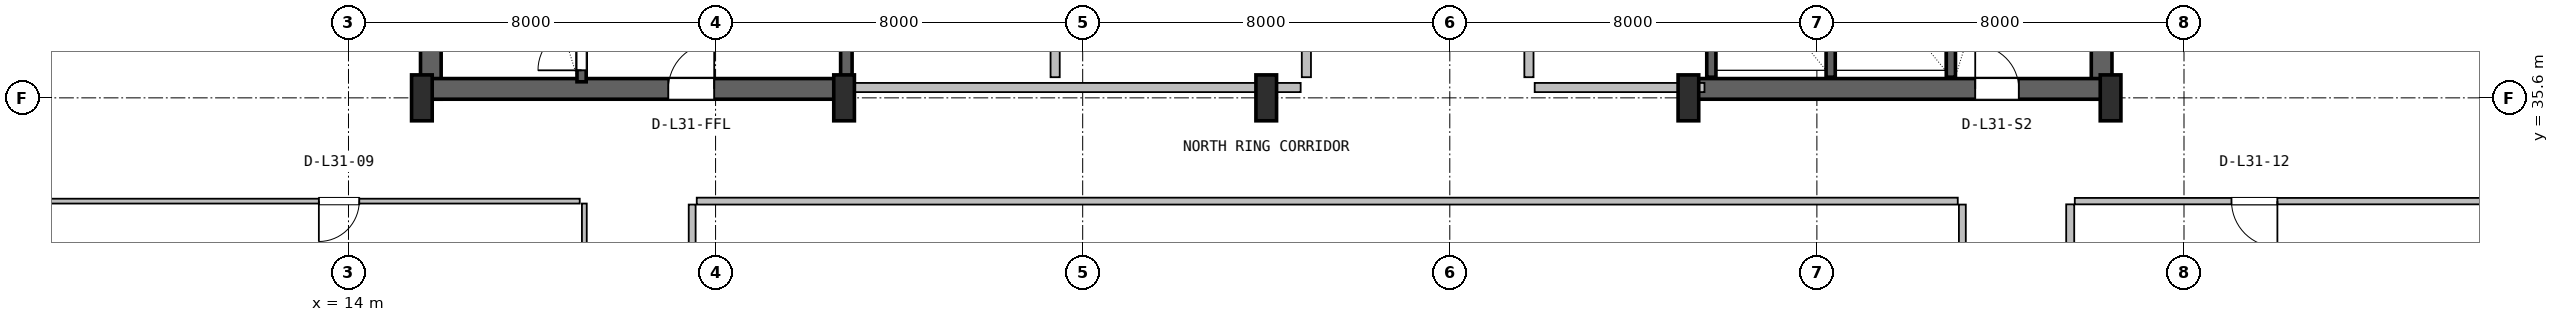
"""IFC4 building model, lengths in metres.
Left out: names, types, materials, properties, quantities, classifications, styles, units other than length and angle.
Written with IfcOpenShell. Run it as: python <this file> out.ifc"""

import sys

from ifc_helpers import new_model, si_unit, direction, frame, frame_2d, origin, origin_2d, place, context, subcontext, project, spatial, rectangle, i_section, extrude, source, transform, mapped, element, fill, save


model = new_model("IFC4")
c1 = context("Model", 3, precision=1e-05, world=origin(), true_north=direction((0.0, 1.0)))
c2 = subcontext(c1, "Body", "Model", "MODEL_VIEW")
j1 = project(units=[si_unit("LENGTHUNIT", "METRE"), si_unit("PLANEANGLEUNIT", "RADIAN")], contexts=[c1])
p1 = place(None, origin())
s1 = spatial("IfcSite", under=j1, at=p1, CompositionType="ELEMENT")
p2 = place(p1, origin())
s2 = spatial("IfcBuilding", under=s1, at=p2, CompositionType="ELEMENT")
p3 = place(p2, frame((0.0, 0.0, 129.6)))
s3 = spatial("IfcBuildingStorey", under=s2, at=p3, CompositionType="ELEMENT", Elevation=129.6)
for number, where, z_axis, x_axis in (
    (1, (15.795, 35.57, 0.0), (0.0, 0.0, 1.0), (0.0, 1.0, 0.0)),
    (2, (52.205, 35.57, 0.0), (0.0, 0.0, 1.0), (0.0, 1.0, 0.0)),
):
    element("IfcWall", number, at=place(p3, frame(where, z_axis=z_axis, x_axis=x_axis)), inside=s3, PredefinedType="SHEAR", context=c2, shape_type="SweptSolid", body=[
        extrude(rectangle(XDim=11.23, YDim=0.45, at=frame_2d((5.615, 0.0))), origin(), (0.0, 0.0, 1.0), 3.55),
    ])
p4 = place(p3, frame((15.57, 35.795, 0.0), z_axis=(0.0, 0.0, 1.0), x_axis=(1.0, 0.0, 0.0)))
e3 = element("IfcWall", 3, at=p4, inside=s3, PredefinedType="SHEAR", context=c2, shape_type="SweptSolid", body=[
    extrude(rectangle(XDim=9.23, YDim=0.45, at=frame_2d((4.615, 0.0))), origin(), (0.0, 0.0, 1.0), 3.55),
])
p5 = place(p4, frame((5.4, 0.0, 0.0)))
e4 = element("IfcOpeningElement", 4, at=p5, cuts=e3, PredefinedType="OPENING", context=c2, shape_type="SweptSolid", body=[
    extrude(rectangle(XDim=1.0, YDim=2.1, at=frame_2d((0.5, 1.05))), frame((0.0, 0.235, 0.0), z_axis=(0.0, -1.0, 0.0), x_axis=(1.0, 0.0, 0.0)), (0.0, 0.0, 1.0), 0.47),
])
p6 = place(p3, frame((43.2, 35.795, 0.0), z_axis=(0.0, 0.0, 1.0), x_axis=(1.0, 0.0, 0.0)))
e5 = element("IfcWall", 5, at=p6, inside=s3, PredefinedType="SHEAR", context=c2, shape_type="SweptSolid", body=[
    extrude(rectangle(XDim=9.23, YDim=0.45, at=frame_2d((4.615, 0.0))), origin(), (0.0, 0.0, 1.0), 3.55),
])
p7 = place(p6, frame((6.25, 0.0, 0.0)))
e6 = element("IfcOpeningElement", 6, at=p7, cuts=e5, PredefinedType="OPENING", context=c2, shape_type="SweptSolid", body=[
    extrude(rectangle(XDim=0.95, YDim=2.1, at=frame_2d((0.475, 1.05))), frame((0.0, 0.235, 0.0), z_axis=(0.0, -1.0, 0.0), x_axis=(1.0, 0.0, 0.0)), (0.0, 0.0, 1.0), 0.47),
])
m1 = source(origin(), c2, "Body", "SweptSolid", [
    extrude(i_section(OverallWidth=0.45, OverallDepth=1.0, WebThickness=0.016, FlangeThickness=0.03, FilletRadius=0.016, at=origin_2d()), origin(), (0.0, 0.0, 1.0), 3.8),
])
for number, where, z_axis, x_axis in (
    (7, (15.6, 35.6, 0.0), (0.0, 0.0, 1.0), (1.0, 0.0, 0.0)),
    (8, (24.8, 35.6, 0.0), (0.0, 0.0, 1.0), (1.0, 0.0, 0.0)),
    (9, (34.0, 35.6, 0.0), (0.0, 0.0, 1.0), (1.0, 0.0, 0.0)),
    (10, (43.2, 35.6, 0.0), (0.0, 0.0, 1.0), (1.0, 0.0, 0.0)),
    (11, (52.4, 35.6, 0.0), (0.0, 0.0, 1.0), (1.0, 0.0, 0.0)),
):
    element("IfcColumn", number, at=place(p3, frame(where, z_axis=z_axis, x_axis=x_axis)), inside=s3, PredefinedType="COLUMN", context=c2, shape_type="MappedRepresentation", body=[
        mapped(m1, transform((0.0, 0.0, 0.0), x_axis=(1.0, 0.0, 0.0), y_axis=(0.0, 1.0, 0.0), z_axis=(0.0, 0.0, 1.0), scale=1.0)),
    ])
p8 = place(p3, frame((19.08, 35.95, 0.0), z_axis=(0.0, 0.0, 1.0), x_axis=(0.0, 1.0, 0.0)))
e12 = element("IfcWall", 12, at=p8, inside=s3, PredefinedType="SHEAR", context=c2, shape_type="SweptSolid", body=[
    extrude(rectangle(XDim=9.65, YDim=0.2, at=frame_2d((4.825, 0.0))), origin(), (0.0, 0.0, 1.0), 3.55),
])
p9 = place(p8, frame((0.25, 0.0, 0.0)))
e13 = element("IfcOpeningElement", 13, at=p9, cuts=e12, PredefinedType="OPENING", context=c2, shape_type="SweptSolid", body=[
    extrude(rectangle(XDim=0.95, YDim=2.1, at=frame_2d((0.475, 1.05))), frame((0.0, 0.11, 0.0), z_axis=(0.0, -1.0, 0.0), x_axis=(1.0, 0.0, 0.0)), (0.0, 0.0, 1.0), 0.22),
])
p10 = place(p3, frame((24.85, 36.05, 0.0), z_axis=(0.0, 0.0, 1.0), x_axis=(0.0, 1.0, 0.0)))
e14 = element("IfcWall", 14, at=p10, inside=s3, PredefinedType="SHEAR", context=c2, shape_type="SweptSolid", body=[
    extrude(rectangle(XDim=10.45, YDim=0.25, at=frame_2d((5.225, 0.0))), origin(), (0.0, 0.0, 1.0), 3.55),
])
p11 = place(p3, frame((48.92, 36.05, 0.0), z_axis=(0.0, 0.0, 1.0), x_axis=(0.0, 1.0, 0.0)))
e15 = element("IfcWall", 15, at=p11, inside=s3, PredefinedType="SHEAR", context=c2, shape_type="SweptSolid", body=[
    extrude(rectangle(XDim=10.5, YDim=0.2, at=frame_2d((5.25, 0.0))), origin(), (0.0, 0.0, 1.0), 3.55),
])
for number, where, z_axis, x_axis in (
    (16, (43.7, 36.05, 0.0), (0.0, 0.0, 1.0), (0.0, 1.0, 0.0)),
    (17, (46.3, 36.05, 0.0), (0.0, 0.0, 1.0), (0.0, 1.0, 0.0)),
):
    element("IfcWall", number, at=place(p3, frame(where, z_axis=z_axis, x_axis=x_axis)), inside=s3, PredefinedType="SHEAR", context=c2, shape_type="SweptSolid", body=[
        extrude(rectangle(XDim=3.05, YDim=0.2, at=frame_2d((1.525, 0.0))), origin(), (0.0, 0.0, 1.0), 3.55),
    ])
p12 = place(p3, frame((25.0, 35.825, 0.0), z_axis=(0.0, 0.0, 1.0), x_axis=(1.0, 0.0, 0.0)))
e18 = element("IfcWall", 18, at=p12, inside=s3, PredefinedType="PLUMBINGWALL", context=c2, shape_type="SweptSolid", body=[
    extrude(rectangle(XDim=9.75, YDim=0.2, at=frame_2d((4.875, 0.0))), origin(), (0.0, 0.0, 1.0), 2.325),
])
for number, where, z_axis, x_axis in (
    (19, (29.4, 36.05, 0.0), (0.0, 0.0, 1.0), (0.0, 1.0, 0.0)),
    (20, (34.875, 36.05, 0.0), (0.0, 0.0, 1.0), (0.0, 1.0, 0.0)),
):
    element("IfcWall", number, at=place(p3, frame(where, z_axis=z_axis, x_axis=x_axis)), inside=s3, PredefinedType="PLUMBINGWALL", context=c2, shape_type="SweptSolid", body=[
        extrude(rectangle(XDim=3.1, YDim=0.2, at=frame_2d((1.55, 0.0))), origin(), (0.0, 0.0, 1.0), 3.53),
    ])
p13 = place(p3, frame((39.85, 35.825, 0.0), z_axis=(0.0, 0.0, 1.0), x_axis=(1.0, 0.0, 0.0)))
e21 = element("IfcWall", 21, at=p13, inside=s3, PredefinedType="SOLIDWALL", context=c2, shape_type="SweptSolid", body=[
    extrude(rectangle(XDim=3.7, YDim=0.2, at=frame_2d((1.85, 0.0))), origin(), (0.0, 0.0, 1.0), 2.325),
])
p14 = place(p3, frame((39.725, 36.05, 0.0), z_axis=(0.0, 0.0, 1.0), x_axis=(0.0, 1.0, 0.0)))
e22 = element("IfcWall", 22, at=p14, inside=s3, PredefinedType="SOLIDWALL", context=c2, shape_type="SweptSolid", body=[
    extrude(rectangle(XDim=3.1, YDim=0.2, at=frame_2d((1.55, 0.0))), origin(), (0.0, 0.0, 1.0), 3.53),
])
p15 = place(p3, frame((19.14, 15.518, 0.0), z_axis=(0.0, 0.0, 1.0), x_axis=(0.0, 1.0, 0.0)))
e23 = element("IfcWall", 23, at=p15, inside=s3, PredefinedType="PARTITIONING", context=c2, shape_type="SweptSolid", body=[
    extrude(rectangle(XDim=17.779, YDim=0.105, at=frame_2d((8.89, 0.0))), origin(), (0.0, 0.0, 1.0), 3.222),
])
p16 = place(p15, frame((4.572, 0.0, 0.0)))
e24 = element("IfcOpeningElement", 24, at=p16, cuts=e23, PredefinedType="OPENING", context=c2, shape_type="SweptSolid", body=[
    extrude(rectangle(XDim=0.88, YDim=2.06, at=frame_2d((0.44, 1.03))), frame((0.0, 0.062, 0.0), z_axis=(0.0, -1.0, 0.0), x_axis=(1.0, 0.0, 0.0)), (0.0, 0.0, 1.0), 0.125),
])
p17 = place(p3, frame((4.68, 33.35, 0.0), z_axis=(0.0, 0.0, 1.0), x_axis=(1.0, 0.0, 0.0)))
e25 = element("IfcWall", 25, at=p17, inside=s3, PredefinedType="PARTITIONING", context=c2, shape_type="SweptSolid", body=[
    extrude(rectangle(XDim=14.36, YDim=0.105, at=frame_2d((7.18, 0.0))), origin(), (0.0, 0.0, 1.0), 3.108),
])
p18 = place(p17, frame((8.675, 0.0, 0.0)))
e26 = element("IfcOpeningElement", 26, at=p18, cuts=e25, PredefinedType="OPENING", context=c2, shape_type="SweptSolid", body=[
    extrude(rectangle(XDim=0.88, YDim=2.06, at=frame_2d((0.44, 1.03))), frame((0.0, 0.062, 0.0), z_axis=(0.0, -1.0, 0.0), x_axis=(1.0, 0.0, 0.0)), (0.0, 0.0, 1.0), 0.125),
])
p19 = place(p3, frame((49.17, 17.855, 0.0), z_axis=(0.0, 0.0, 1.0), x_axis=(0.0, 1.0, 0.0)))
e27 = element("IfcWall", 27, at=p19, inside=s3, PredefinedType="PARTITIONING", context=c2, shape_type="SweptSolid", body=[
    extrude(rectangle(XDim=15.42, YDim=0.15, at=frame_2d((7.71, 0.0))), origin(), (0.0, 0.0, 1.0), 3.222),
])
p20 = place(p3, frame((21.59, 33.35, 0.0), z_axis=(0.0, 0.0, 1.0), x_axis=(1.0, 0.0, 0.0)))
e28 = element("IfcWall", 28, at=p20, inside=s3, PredefinedType="PARTITIONING", context=c2, shape_type="SweptSolid", body=[
    extrude(rectangle(XDim=27.48, YDim=0.15, at=frame_2d((13.74, 0.0))), origin(), (0.0, 0.0, 1.0), 2.83),
])
p21 = place(p3, frame((21.49, 17.855, 0.0), z_axis=(0.0, 0.0, 1.0), x_axis=(0.0, 1.0, 0.0)))
e29 = element("IfcWall", 29, at=p21, inside=s3, PredefinedType="PARTITIONING", context=c2, shape_type="SweptSolid", body=[
    extrude(rectangle(XDim=15.42, YDim=0.15, at=frame_2d((7.71, 0.0))), origin(), (0.0, 0.0, 1.0), 3.222),
])
p22 = place(p3, frame((51.52, 15.518, 0.0), z_axis=(0.0, 0.0, 1.0), x_axis=(0.0, 1.0, 0.0)))
e30 = element("IfcWall", 30, at=p22, inside=s3, PredefinedType="PARTITIONING", context=c2, shape_type="SweptSolid", body=[
    extrude(rectangle(XDim=17.762, YDim=0.175, at=frame_2d((8.881, 0.0))), origin(), (0.0, 0.0, 1.0), 3.222),
])
p23 = place(p22, frame((4.487, 0.0, 0.0)))
e31 = element("IfcOpeningElement", 31, at=p23, cuts=e30, PredefinedType="OPENING", context=c2, shape_type="SweptSolid", body=[
    extrude(rectangle(XDim=1.05, YDim=2.1, at=frame_2d((0.525, 1.05))), frame((0.0, 0.098, 0.0), z_axis=(0.0, -1.0, 0.0), x_axis=(1.0, 0.0, 0.0)), (0.0, 0.0, 1.0), 0.195),
])
p24 = place(p3, frame((51.62, 33.35, 0.0), z_axis=(0.0, 0.0, 1.0), x_axis=(1.0, 0.0, 0.0)))
e32 = element("IfcWall", 32, at=p24, inside=s3, PredefinedType="PARTITIONING", context=c2, shape_type="SweptSolid", body=[
    extrude(rectangle(XDim=11.7, YDim=0.14, at=frame_2d((5.85, 0.0))), origin(), (0.0, 0.0, 1.0), 3.108),
])
p25 = place(p24, frame((3.415, 0.0, 0.0)))
e33 = element("IfcOpeningElement", 33, at=p25, cuts=e32, PredefinedType="OPENING", context=c2, shape_type="SweptSolid", body=[
    extrude(rectangle(XDim=1.0, YDim=2.1, at=frame_2d((0.5, 1.05))), frame((0.0, 0.08, 0.0), z_axis=(0.0, -1.0, 0.0), x_axis=(1.0, 0.0, 0.0)), (0.0, 0.0, 1.0), 0.16),
])
m2 = source(origin(), c2, "Body", "SweptSolid", [
    extrude(rectangle(XDim=0.95, YDim=2.1, at=frame_2d((0.475, 1.05))), frame((0.0, 0.025, 0.0), z_axis=(0.0, -1.0, 0.0), x_axis=(1.0, 0.0, 0.0)), (0.0, 0.0, 1.0), 0.05),
])
p26 = place(p9, origin())
e34 = element("IfcDoor", 34, at=p26, inside=s3, OperationType="SINGLE_SWING_LEFT", PredefinedType="DOOR", context=c2, shape_type="MappedRepresentation", body=[
    mapped(m2, transform((0.0, 0.0, 0.0), x_axis=(1.0, 0.0, 0.0), y_axis=(0.0, 1.0, 0.0), z_axis=(0.0, 0.0, 1.0), scale=1.0)),
])
fill(e13, e34)
m3 = source(origin(), c2, "Body", "SweptSolid", [
    extrude(rectangle(XDim=1.0, YDim=2.1, at=frame_2d((0.5, 1.05))), frame((0.0, 0.025, 0.0), z_axis=(0.0, -1.0, 0.0), x_axis=(1.0, 0.0, 0.0)), (0.0, 0.0, 1.0), 0.05),
])
p27 = place(p5, origin())
e35 = element("IfcDoor", 35, at=p27, inside=s3, OperationType="SINGLE_SWING_RIGHT", PredefinedType="DOOR", context=c2, shape_type="MappedRepresentation", body=[
    mapped(m3, transform((0.0, 0.0, 0.0), x_axis=(1.0, 0.0, 0.0), y_axis=(0.0, 1.0, 0.0), z_axis=(0.0, 0.0, 1.0), scale=1.0)),
])
fill(e4, e35)
p28 = place(p7, origin())
e36 = element("IfcDoor", 36, at=p28, inside=s3, OperationType="SINGLE_SWING_LEFT", PredefinedType="DOOR", context=c2, shape_type="MappedRepresentation", body=[
    mapped(m2, transform((0.0, 0.0, 0.0), x_axis=(1.0, 0.0, 0.0), y_axis=(0.0, 1.0, 0.0), z_axis=(0.0, 0.0, 1.0), scale=1.0)),
])
fill(e6, e36)
m4 = source(origin(), c2, "Body", "SweptSolid", [
    extrude(rectangle(XDim=0.88, YDim=2.06, at=frame_2d((0.44, 1.03))), frame((0.0, 0.025, 0.0), z_axis=(0.0, -1.0, 0.0), x_axis=(1.0, 0.0, 0.0)), (0.0, 0.0, 1.0), 0.05),
])
p29 = place(p18, frame((0.88, 0.0, 0.0), z_axis=(0.0, 0.0, 1.0), x_axis=(-1.0, 0.0, 0.0)))
e37 = element("IfcDoor", 37, at=p29, inside=s3, OperationType="SINGLE_SWING_LEFT", PredefinedType="DOOR", context=c2, shape_type="MappedRepresentation", body=[
    mapped(m4, transform((0.0, 0.0, 0.0), x_axis=(1.0, 0.0, 0.0), y_axis=(0.0, 1.0, 0.0), z_axis=(0.0, 0.0, 1.0), scale=1.0)),
])
fill(e26, e37)
m5 = source(origin(), c2, "Body", "SweptSolid", [
    extrude(rectangle(XDim=1.0, YDim=2.1, at=frame_2d((0.5, 1.05))), frame((0.0, 0.025, 0.0), z_axis=(0.0, -1.0, 0.0), x_axis=(1.0, 0.0, 0.0)), (0.0, 0.0, 1.0), 0.05),
])
p30 = place(p25, frame((1.0, 0.0, 0.0), z_axis=(0.0, 0.0, 1.0), x_axis=(-1.0, 0.0, 0.0)))
e38 = element("IfcDoor", 38, at=p30, inside=s3, OperationType="SINGLE_SWING_RIGHT", PredefinedType="DOOR", context=c2, shape_type="MappedRepresentation", body=[
    mapped(m5, transform((0.0, 0.0, 0.0), x_axis=(1.0, 0.0, 0.0), y_axis=(0.0, 1.0, 0.0), z_axis=(0.0, 0.0, 1.0), scale=1.0)),
])
fill(e33, e38)
save(model, sys.argv[1])
